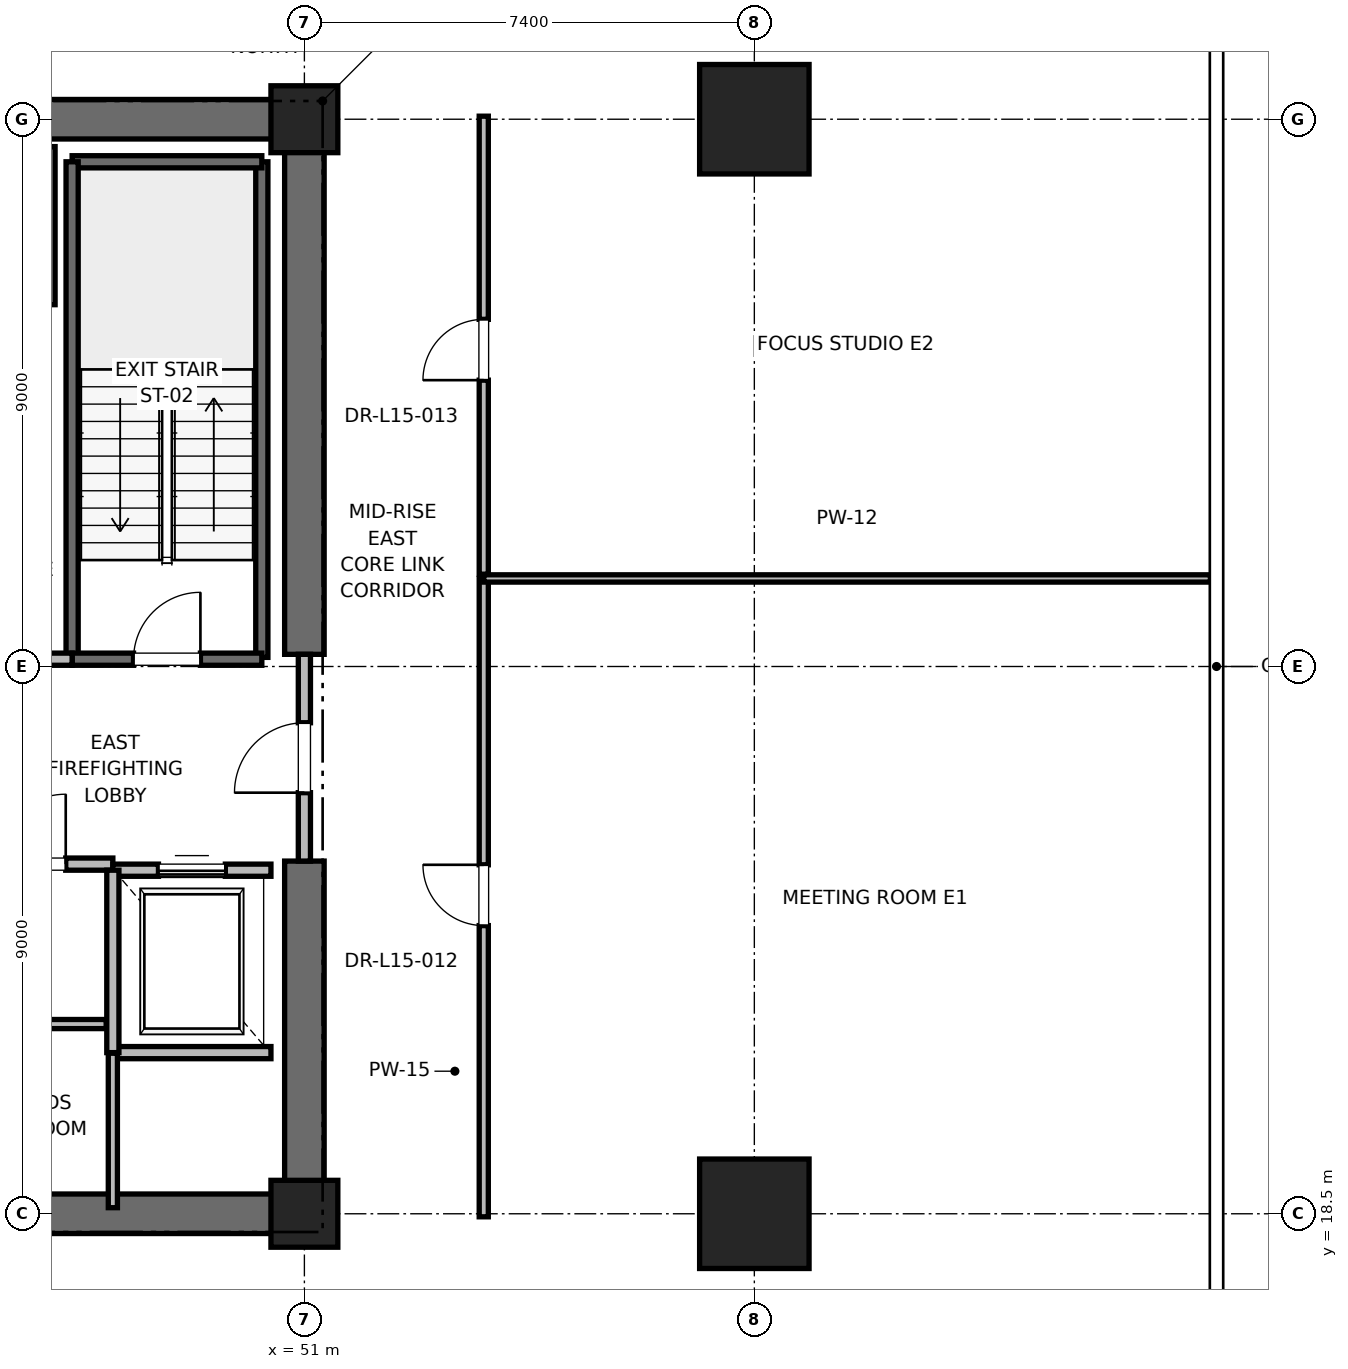
"""IFC4 building model, lengths in metres.
Left out: names, types, materials, properties, quantities, classifications, styles, units other than length and angle.
Written with IfcOpenShell. Run it as: python <this file> out.ifc"""

import sys

from ifc_helpers import new_model, si_unit, direction, frame, frame_2d, origin, origin_2d, place, context, subcontext, project, spatial, rectangle, extrude, element, fill, save


model = new_model("IFC4")
c1 = context("Model", 3, precision=1e-05, world=origin(), true_north=direction((0.0, 1.0)))
c2 = subcontext(c1, "Body", "Model", "MODEL_VIEW")
j1 = project(units=[si_unit("LENGTHUNIT", "METRE"), si_unit("PLANEANGLEUNIT", "RADIAN")], contexts=[c1])
p1 = place(None, origin())
s1 = spatial("IfcSite", under=j1, at=p1, CompositionType="ELEMENT")
p2 = place(p1, origin())
s2 = spatial("IfcBuilding", under=s1, at=p2, CompositionType="ELEMENT")
p3 = place(p2, frame((0.0, 0.0, 67.6)))
s3 = spatial("IfcBuildingStorey", under=s2, at=p3, CompositionType="ELEMENT", Elevation=67.6)
for number, where, z_axis, x_axis in (
    (1, (58.4, 18.5, 0.0), (0.0, 0.0, 1.0), (1.0, 0.0, 0.0)),
    (2, (58.4, 36.5, 0.0), (0.0, 0.0, 1.0), (1.0, 0.0, 0.0)),
):
    element("IfcColumn", number, at=place(p3, frame(where, z_axis=z_axis, x_axis=x_axis)), inside=s3, PredefinedType="COLUMN", context=c2, shape_type="SweptSolid", body=[
        extrude(rectangle(XDim=1.8, YDim=1.8, at=origin_2d()), origin(), (0.0, 0.0, 1.0), 4.0),
    ])
for number, where, z_axis, x_axis in (
    (3, (51.0, 18.5, 0.0), (0.0, 0.0, 1.0), (1.0, 0.0, 0.0)),
    (4, (51.0, 36.5, 0.0), (0.0, 0.0, 1.0), (1.0, 0.0, 0.0)),
):
    element("IfcColumn", number, at=place(p3, frame(where, z_axis=z_axis, x_axis=x_axis)), inside=s3, PredefinedType="PILASTER", context=c2, shape_type="SweptSolid", body=[
        extrude(rectangle(XDim=1.1, YDim=1.1, at=origin_2d()), origin(), (0.0, 0.0, 1.0), 4.0),
    ])
p4 = place(p3, frame((41.8, 18.5, 0.0), z_axis=(0.0, 0.0, 1.0), x_axis=(1.0, 0.0, 0.0)))
e5 = element("IfcWall", 5, at=p4, inside=s3, PredefinedType="SHEAR", context=c2, shape_type="SweptSolid", body=[
    extrude(rectangle(XDim=9.2, YDim=0.65, at=frame_2d((4.6, 0.0))), origin(), (0.0, 0.0, 1.0), 3.76),
])
for number, where, z_axis, x_axis in (
    (6, (45.2, 36.5, 0.0), (0.0, 0.0, 1.0), (1.0, 0.0, 0.0)),
    (7, (51.0, 18.5, 0.0), (0.0, 0.0, 1.0), (0.0, 1.0, 0.0)),
):
    element("IfcWall", number, at=place(p3, frame(where, z_axis=z_axis, x_axis=x_axis)), inside=s3, PredefinedType="SHEAR", context=c2, shape_type="SweptSolid", body=[
        extrude(rectangle(XDim=5.8, YDim=0.65, at=frame_2d((2.9, 0.0))), origin(), (0.0, 0.0, 1.0), 3.76),
    ])
p5 = place(p3, frame((51.0, 27.7, 0.0), z_axis=(0.0, 0.0, 1.0), x_axis=(0.0, 1.0, 0.0)))
e8 = element("IfcWall", 8, at=p5, inside=s3, PredefinedType="SHEAR", context=c2, shape_type="SweptSolid", body=[
    extrude(rectangle(XDim=8.8, YDim=0.65, at=frame_2d((4.4, 0.0))), origin(), (0.0, 0.0, 1.0), 3.76),
])
p6 = place(p3, frame((50.3, 27.65, 0.0), z_axis=(0.0, 0.0, 1.0), x_axis=(0.0, 1.0, 0.0)))
e9 = element("IfcWall", 9, at=p6, inside=s3, PredefinedType="SOLIDWALL", context=c2, shape_type="SweptSolid", body=[
    extrude(rectangle(XDim=8.15, YDim=0.2, at=frame_2d((4.075, 0.0))), origin(), (0.0, 0.0, 1.0), 3.76),
])
p7 = place(p3, frame((47.18, 35.8, 0.0), z_axis=(0.0, 0.0, 1.0), x_axis=(1.0, 0.0, 0.0)))
e10 = element("IfcWall", 10, at=p7, inside=s3, PredefinedType="SOLIDWALL", context=c2, shape_type="SweptSolid", body=[
    extrude(rectangle(XDim=3.12, YDim=0.2, at=frame_2d((1.56, 0.0))), origin(), (0.0, 0.0, 1.0), 3.76),
])
p8 = place(p3, frame((47.18, 27.62, 0.0), z_axis=(0.0, 0.0, 1.0), x_axis=(0.0, 1.0, 0.0)))
e11 = element("IfcWall", 11, at=p8, inside=s3, PredefinedType="SOLIDWALL", context=c2, shape_type="SweptSolid", body=[
    extrude(rectangle(XDim=8.18, YDim=0.2, at=frame_2d((4.09, 0.0))), origin(), (0.0, 0.0, 1.0), 3.76),
])
p9 = place(p3, frame((47.18, 27.62, 0.0), z_axis=(0.0, 0.0, 1.0), x_axis=(1.0, 0.0, 0.0)))
e12 = element("IfcWall", 12, at=p9, inside=s3, PredefinedType="SOLIDWALL", context=c2, shape_type="SweptSolid", body=[
    extrude(rectangle(XDim=3.12, YDim=0.2, at=frame_2d((1.56, 0.0))), origin(), (0.0, 0.0, 1.0), 3.76),
])
p10 = place(p9, frame((1.01, 0.0, 0.0)))
e13 = element("IfcOpeningElement", 13, at=p10, cuts=e12, PredefinedType="OPENING", context=c2, shape_type="SweptSolid", body=[
    extrude(rectangle(XDim=1.1, YDim=2.15, at=frame_2d((0.55, 1.075))), frame((0.0, 0.1, 0.0), z_axis=(0.0, -1.0, 0.0), x_axis=(1.0, 0.0, 0.0)), (0.0, 0.0, 1.0), 0.2),
])
p11 = place(p3, frame((45.15, 24.25, 0.0), z_axis=(0.0, 0.0, 1.0), x_axis=(1.0, 0.0, 0.0)))
e14 = element("IfcWall", 14, at=p11, inside=s3, PredefinedType="PARTITIONING", context=c2, shape_type="SweptSolid", body=[
    extrude(rectangle(XDim=2.7, YDim=0.2, at=frame_2d((1.35, 0.0))), origin(), (0.0, 0.0, 1.0), 3.76),
])
p12 = place(p11, frame((0.775, 0.0, 0.0)))
e15 = element("IfcOpeningElement", 15, at=p12, cuts=e14, PredefinedType="OPENING", context=c2, shape_type="SweptSolid", body=[
    extrude(rectangle(XDim=1.15, YDim=2.2, at=frame_2d((0.575, 1.1))), frame((0.0, 0.1, 0.0), z_axis=(0.0, -1.0, 0.0), x_axis=(1.0, 0.0, 0.0)), (0.0, 0.0, 1.0), 0.2),
])
p13 = place(p3, frame((45.15, 27.62, 0.0), z_axis=(0.0, 0.0, 1.0), x_axis=(1.0, 0.0, 0.0)))
e16 = element("IfcWall", 16, at=p13, inside=s3, PredefinedType="PARTITIONING", context=c2, shape_type="SweptSolid", body=[
    extrude(rectangle(XDim=2.03, YDim=0.2, at=frame_2d((1.015, 0.0))), origin(), (0.0, 0.0, 1.0), 3.76),
])
p14 = place(p13, frame((0.44, 0.0, 0.0)))
e17 = element("IfcOpeningElement", 17, at=p14, cuts=e16, PredefinedType="OPENING", context=c2, shape_type="SweptSolid", body=[
    extrude(rectangle(XDim=1.15, YDim=2.2, at=frame_2d((0.575, 1.1))), frame((0.0, 0.1, 0.0), z_axis=(0.0, -1.0, 0.0), x_axis=(1.0, 0.0, 0.0)), (0.0, 0.0, 1.0), 0.2),
])
p15 = place(p3, frame((51.0, 24.3, 0.0), z_axis=(0.0, 0.0, 1.0), x_axis=(0.0, 1.0, 0.0)))
e18 = element("IfcWall", 18, at=p15, inside=s3, PredefinedType="PARTITIONING", context=c2, shape_type="SweptSolid", body=[
    extrude(rectangle(XDim=3.4, YDim=0.2, at=frame_2d((1.7, 0.0))), origin(), (0.0, 0.0, 1.0), 2.54),
])
p16 = place(p15, frame((1.125, 0.0, 0.0)))
e19 = element("IfcOpeningElement", 19, at=p16, cuts=e18, PredefinedType="OPENING", context=c2, shape_type="SweptSolid", body=[
    extrude(rectangle(XDim=1.15, YDim=2.2, at=frame_2d((0.575, 1.1))), frame((0.0, 0.1, 0.0), z_axis=(0.0, -1.0, 0.0), x_axis=(1.0, 0.0, 0.0)), (0.0, 0.0, 1.0), 0.2),
])
p17 = place(p3, frame((47.85, 21.15, 0.0), z_axis=(0.0, 0.0, 1.0), x_axis=(1.0, 0.0, 0.0)))
e20 = element("IfcWall", 20, at=p17, inside=s3, PredefinedType="SOLIDWALL", context=c2, shape_type="SweptSolid", body=[
    extrude(rectangle(XDim=2.6, YDim=0.2, at=frame_2d((1.3, 0.0))), origin(), (0.0, 0.0, 1.0), 3.76),
])
p18 = place(p3, frame((50.45, 24.15, 0.0), z_axis=(0.0, 0.0, 1.0), x_axis=(-1.0, 0.0, 0.0)))
e21 = element("IfcWall", 21, at=p18, inside=s3, PredefinedType="SOLIDWALL", context=c2, shape_type="SweptSolid", body=[
    extrude(rectangle(XDim=2.6, YDim=0.2, at=frame_2d((1.3, 0.0))), origin(), (0.0, 0.0, 1.0), 2.54),
])
p19 = place(p18, frame((0.75, 0.0, 0.0)))
e22 = element("IfcOpeningElement", 22, at=p19, cuts=e21, PredefinedType="OPENING", context=c2, shape_type="SweptSolid", body=[
    extrude(rectangle(XDim=1.1, YDim=2.2, at=frame_2d((0.55, 1.1))), frame((0.0, 0.1, 0.0), z_axis=(0.0, -1.0, 0.0), x_axis=(1.0, 0.0, 0.0)), (0.0, 0.0, 1.0), 0.2),
])
p20 = place(p3, frame((47.85, 24.15, 0.0), z_axis=(0.0, 0.0, 1.0), x_axis=(0.0, -1.0, 0.0)))
e23 = element("IfcWall", 23, at=p20, inside=s3, PredefinedType="SOLIDWALL", context=c2, shape_type="SweptSolid", body=[
    extrude(rectangle(XDim=3.0, YDim=0.2, at=frame_2d((1.5, 0.0))), origin(), (0.0, 0.0, 1.0), 3.76),
])
p21 = place(p3, frame((46.8, 33.45, 0.0), z_axis=(0.0, 0.0, 1.0), x_axis=(0.0, 1.0, 0.0)))
e24 = element("IfcWall", 24, at=p21, inside=s3, PredefinedType="SOLIDWALL", context=c2, shape_type="SweptSolid", body=[
    extrude(rectangle(XDim=2.6, YDim=0.2, at=frame_2d((1.3, 0.0))), origin(), (0.0, 0.0, 1.0), 3.76),
])
p22 = place(p3, frame((47.85, 18.6, 0.0), z_axis=(0.0, 0.0, 1.0), x_axis=(0.0, 1.0, 0.0)))
e25 = element("IfcWall", 25, at=p22, inside=s3, PredefinedType="PARTITIONING", context=c2, shape_type="SweptSolid", body=[
    extrude(rectangle(XDim=2.54, YDim=0.15, at=frame_2d((1.27, 0.0))), origin(), (0.0, 0.0, 1.0), 2.85),
])
p23 = place(p3, frame((41.76, 21.62, 0.0), z_axis=(0.0, 0.0, 1.0), x_axis=(1.0, 0.0, 0.0)))
e26 = element("IfcWall", 26, at=p23, inside=s3, PredefinedType="PARTITIONING", context=c2, shape_type="SweptSolid", body=[
    extrude(rectangle(XDim=5.98, YDim=0.15, at=frame_2d((2.99, 0.0))), origin(), (0.0, 0.0, 1.0), 2.85),
])
p24 = place(p23, frame((2.49, 0.0, 0.0)))
e27 = element("IfcOpeningElement", 27, at=p24, cuts=e26, PredefinedType="OPENING", context=c2, shape_type="SweptSolid", body=[
    extrude(rectangle(XDim=1.0, YDim=2.15, at=frame_2d((0.5, 1.075))), frame((0.0, 0.075, 0.0), z_axis=(0.0, -1.0, 0.0), x_axis=(1.0, 0.0, 0.0)), (0.0, 0.0, 1.0), 0.15),
])
p25 = place(p3, frame((53.95, 18.45, 0.0), z_axis=(0.0, 0.0, 1.0), x_axis=(0.0, 1.0, 0.0)))
e28 = element("IfcWall", 28, at=p25, inside=s3, PredefinedType="PARTITIONING", context=c2, shape_type="SweptSolid", body=[
    extrude(rectangle(XDim=10.498, YDim=0.15, at=frame_2d((5.249, 0.0))), origin(), (0.0, 0.0, 1.0), 2.85),
])
p26 = place(p25, frame((4.789, 0.0, 0.0)))
e29 = element("IfcOpeningElement", 29, at=p26, cuts=e28, PredefinedType="OPENING", context=c2, shape_type="SweptSolid", body=[
    extrude(rectangle(XDim=1.0, YDim=2.15, at=frame_2d((0.5, 1.075))), frame((0.0, 0.075, 0.0), z_axis=(0.0, -1.0, 0.0), x_axis=(1.0, 0.0, 0.0)), (0.0, 0.0, 1.0), 0.15),
])
p27 = place(p3, frame((53.95, 28.948, 0.0), z_axis=(0.0, 0.0, 1.0), x_axis=(1.0, 0.0, 0.0)))
e30 = element("IfcWall", 30, at=p27, inside=s3, PredefinedType="PARTITIONING", context=c2, shape_type="SweptSolid", body=[
    extrude(rectangle(XDim=11.951, YDim=0.12, at=frame_2d((5.976, 0.0))), origin(), (0.0, 0.0, 1.0), 2.85),
])
p28 = place(p3, frame((53.95, 29.018, 0.0), z_axis=(0.0, 0.0, 1.0), x_axis=(0.0, 1.0, 0.0)))
e31 = element("IfcWall", 31, at=p28, inside=s3, PredefinedType="PARTITIONING", context=c2, shape_type="SweptSolid", body=[
    extrude(rectangle(XDim=7.532, YDim=0.15, at=frame_2d((3.766, 0.0))), origin(), (0.0, 0.0, 1.0), 2.85),
])
p29 = place(p28, frame((3.191, 0.0, 0.0)))
e32 = element("IfcOpeningElement", 32, at=p29, cuts=e31, PredefinedType="OPENING", context=c2, shape_type="SweptSolid", body=[
    extrude(rectangle(XDim=1.0, YDim=2.15, at=frame_2d((0.5, 1.075))), frame((0.0, 0.075, 0.0), z_axis=(0.0, -1.0, 0.0), x_axis=(1.0, 0.0, 0.0)), (0.0, 0.0, 1.0), 0.15),
])
p30 = place(p10, origin())
e33 = element("IfcDoor", 33, at=p30, inside=s3, OperationType="SINGLE_SWING_RIGHT", PredefinedType="DOOR", context=c2, shape_type="SweptSolid", body=[
    extrude(rectangle(XDim=1.1, YDim=2.15, at=frame_2d((0.55, 1.075))), frame((0.0, 0.025, 0.0), z_axis=(0.0, -1.0, 0.0), x_axis=(1.0, 0.0, 0.0)), (0.0, 0.0, 1.0), 0.05),
])
fill(e13, e33)
p31 = place(p12, origin())
e34 = element("IfcDoor", 34, at=p31, inside=s3, OperationType="SINGLE_SWING_RIGHT", PredefinedType="DOOR", context=c2, shape_type="SweptSolid", body=[
    extrude(rectangle(XDim=1.15, YDim=2.2, at=frame_2d((0.575, 1.1))), frame((0.0, 0.025, 0.0), z_axis=(0.0, -1.0, 0.0), x_axis=(1.0, 0.0, 0.0)), (0.0, 0.0, 1.0), 0.05),
])
fill(e15, e34)
p32 = place(p16, origin())
e35 = element("IfcDoor", 35, at=p32, inside=s3, OperationType="SINGLE_SWING_LEFT", PredefinedType="DOOR", context=c2, shape_type="SweptSolid", body=[
    extrude(rectangle(XDim=1.15, YDim=2.2, at=frame_2d((0.575, 1.1))), frame((0.0, 0.025, 0.0), z_axis=(0.0, -1.0, 0.0), x_axis=(1.0, 0.0, 0.0)), (0.0, 0.0, 1.0), 0.05),
])
fill(e19, e35)
p33 = place(p19, origin())
e36 = element("IfcDoor", 36, at=p33, inside=s3, OperationType="SLIDING_TO_RIGHT", PredefinedType="DOOR", context=c2, shape_type="SweptSolid", body=[
    extrude(rectangle(XDim=1.1, YDim=2.2, at=frame_2d((0.55, 1.1))), frame((0.0, 0.025, 0.0), z_axis=(0.0, -1.0, 0.0), x_axis=(1.0, 0.0, 0.0)), (0.0, 0.0, 1.0), 0.05),
])
fill(e22, e36)
p34 = place(p26, origin())
e37 = element("IfcDoor", 37, at=p34, inside=s3, OperationType="SINGLE_SWING_RIGHT", PredefinedType="DOOR", context=c2, shape_type="SweptSolid", body=[
    extrude(rectangle(XDim=1.0, YDim=2.15, at=frame_2d((0.5, 1.075))), frame((0.0, 0.025, 0.0), z_axis=(0.0, -1.0, 0.0), x_axis=(1.0, 0.0, 0.0)), (0.0, 0.0, 1.0), 0.05),
])
fill(e29, e37)
p35 = place(p29, origin())
e38 = element("IfcDoor", 38, at=p35, inside=s3, OperationType="SINGLE_SWING_LEFT", PredefinedType="DOOR", context=c2, shape_type="SweptSolid", body=[
    extrude(rectangle(XDim=1.0, YDim=2.15, at=frame_2d((0.5, 1.075))), frame((0.0, 0.025, 0.0), z_axis=(0.0, -1.0, 0.0), x_axis=(1.0, 0.0, 0.0)), (0.0, 0.0, 1.0), 0.05),
])
fill(e32, e38)
save(model, sys.argv[1])
